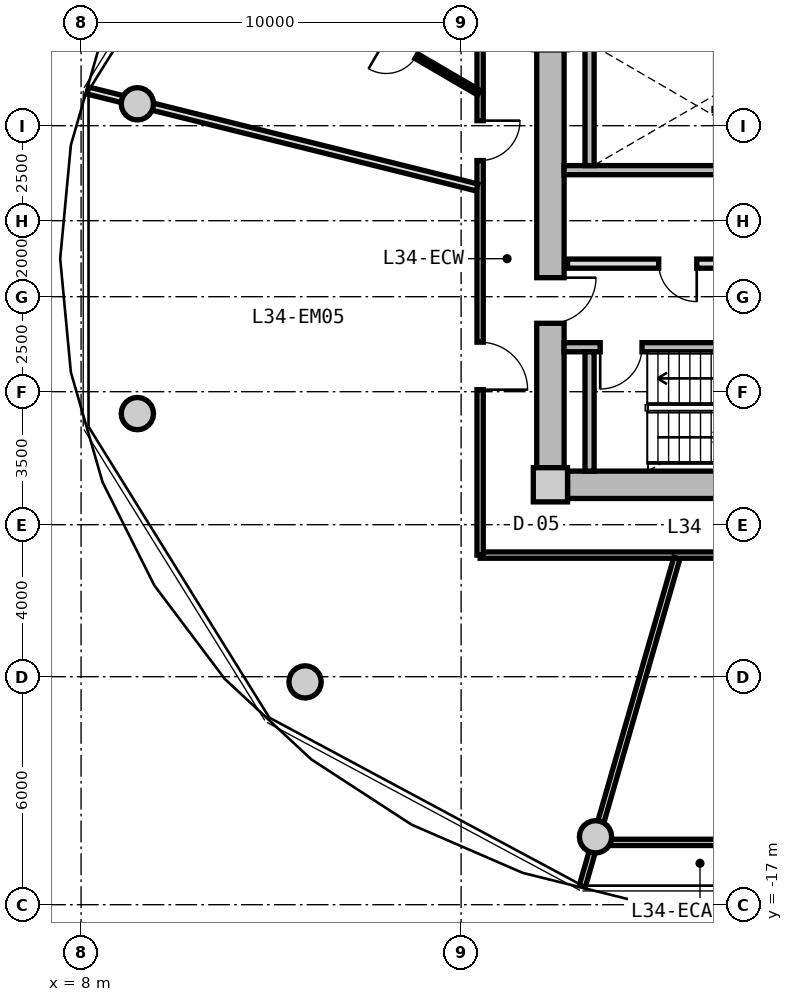
"""IFC4 building model, lengths in metres.
Left out: names, types, materials, properties, quantities, classifications, styles, units other than length and angle.
Written with IfcOpenShell. Run it as: python <this file> out.ifc"""

import sys

from ifc_helpers import new_model, si_unit, direction, frame, frame_2d, origin, origin_2d, place, context, subcontext, project, spatial, rectangle, circle, extrude, source, transform, mapped, element, fill, save


model = new_model("IFC4")
c1 = context("Model", 3, precision=1e-05, world=origin(), true_north=direction((0.0, 1.0)))
c2 = subcontext(c1, "Body", "Model", "MODEL_VIEW")
j1 = project(units=[si_unit("LENGTHUNIT", "METRE"), si_unit("PLANEANGLEUNIT", "RADIAN")], contexts=[c1])
p1 = place(None, origin())
s1 = spatial("IfcSite", under=j1, at=p1, CompositionType="ELEMENT")
p2 = place(p1, origin())
s2 = spatial("IfcBuilding", under=s1, at=p2, CompositionType="ELEMENT")
p3 = place(p2, frame((0.0, 0.0, 111.5)))
s3 = spatial("IfcBuildingStorey", under=s2, at=p3, CompositionType="ELEMENT", Elevation=111.5)
m1 = source(origin(), c2, "Body", "SweptSolid", [
    extrude(rectangle(XDim=0.9, YDim=0.9, at=origin_2d()), origin(), (0.0, 0.0, 1.0), 3.05),
])
p4 = place(p3, frame((20.35, -5.95, 0.0), z_axis=(0.0, 0.0, 1.0), x_axis=(1.0, 0.0, 0.0)))
e1 = element("IfcColumn", 1, at=p4, inside=s3, PredefinedType="COLUMN", context=c2, shape_type="MappedRepresentation", body=[
    mapped(m1, transform((0.0, 0.0, 0.0), x_axis=(1.0, 0.0, 0.0), y_axis=(0.0, 1.0, 0.0), z_axis=(0.0, 0.0, 1.0), scale=1.0)),
])
m2 = source(origin(), c2, "Body", "SweptSolid", [
    extrude(rectangle(XDim=14.4, YDim=0.72, at=frame_2d((7.2, 0.0))), origin(), (0.0, 0.0, 1.0), 2.79),
])
p5 = place(p3, frame((35.2, -5.95, 0.0), z_axis=(0.0, 0.0, 1.0), x_axis=(-1.0, 0.0, 0.0)))
e2 = element("IfcWall", 2, at=p5, inside=s3, PredefinedType="SHEAR", context=c2, shape_type="MappedRepresentation", body=[
    mapped(m2, transform((0.0, 0.0, 0.0), x_axis=(1.0, 0.0, 0.0), y_axis=(0.0, 1.0, 0.0), z_axis=(0.0, 0.0, 1.0), scale=1.0)),
])
m3 = source(origin(), c2, "Body", "SweptSolid", [
    extrude(rectangle(XDim=11.0, YDim=0.72, at=frame_2d((5.5, 0.0))), origin(), (0.0, 0.0, 1.0), 2.79),
])
p6 = place(p3, frame((20.35, -5.5, 0.0), z_axis=(0.0, 0.0, 1.0), x_axis=(0.0, 1.0, 0.0)))
e3 = element("IfcWall", 3, at=p6, inside=s3, PredefinedType="SHEAR", context=c2, shape_type="MappedRepresentation", body=[
    mapped(m3, transform((0.0, 0.0, 0.0), x_axis=(1.0, 0.0, 0.0), y_axis=(0.0, 1.0, 0.0), z_axis=(0.0, 0.0, 1.0), scale=1.0)),
])
p7 = place(p6, frame((3.8, 0.0, 0.0)))
e4 = element("IfcOpeningElement", 4, at=p7, cuts=e3, PredefinedType="OPENING", context=c2, shape_type="SweptSolid", body=[
    extrude(rectangle(XDim=1.2, YDim=2.15, at=frame_2d((0.6, 1.075))), frame((0.0, 0.37, 0.0), z_axis=(0.0, -1.0, 0.0), x_axis=(1.0, 0.0, 0.0)), (0.0, 0.0, 1.0), 0.74),
])
m4 = source(origin(), c2, "Body", "SweptSolid", [
    extrude(circle(Radius=0.425, at=origin_2d()), origin(), (0.0, 0.0, 1.0), 3.05),
])
for number, where, z_axis, x_axis in (
    (5, (9.481, 4.076, 0.0), (0.0, 0.0, 1.0), (1.0, 0.0, 0.0)),
    (6, (9.481, -4.076, 0.0), (0.0, 0.0, 1.0), (1.0, 0.0, 0.0)),
    (7, (13.894, -11.137, 0.0), (0.0, 0.0, 1.0), (1.0, 0.0, 0.0)),
    (8, (21.537, -15.213, 0.0), (0.0, 0.0, 1.0), (1.0, 0.0, 0.0)),
):
    element("IfcColumn", number, at=place(p3, frame(where, z_axis=z_axis, x_axis=x_axis)), inside=s3, PredefinedType="COLUMN", context=c2, shape_type="MappedRepresentation", body=[
        mapped(m4, transform((0.0, 0.0, 0.0), x_axis=(1.0, 0.0, 0.0), y_axis=(0.0, 1.0, 0.0), z_axis=(0.0, 0.0, 1.0), scale=1.0)),
    ])
m5 = source(origin(), c2, "Body", "SweptSolid", [
    extrude(rectangle(XDim=7.83, YDim=0.24, at=frame_2d((3.915, 0.0))), origin(), (0.0, 0.0, 1.0), 2.79),
])
p8 = place(p3, frame((20.71, 2.33, 0.0), z_axis=(0.0, 0.0, 1.0), x_axis=(1.0, 0.0, 0.0)))
e9 = element("IfcWall", 9, at=p8, inside=s3, PredefinedType="PARTITIONING", context=c2, shape_type="MappedRepresentation", body=[
    mapped(m5, transform((0.0, 0.0, 0.0), x_axis=(1.0, 0.0, 0.0), y_axis=(0.0, 1.0, 0.0), z_axis=(0.0, 0.0, 1.0), scale=1.0)),
])
m6 = source(origin(), c2, "Body", "SweptSolid", [
    extrude(rectangle(XDim=3.14, YDim=0.24, at=frame_2d((1.57, 0.0))), origin(), (0.0, 0.0, 1.0), 2.79),
])
p9 = place(p3, frame((21.38, 2.45, 0.0), z_axis=(0.0, 0.0, 1.0), x_axis=(0.0, 1.0, 0.0)))
e10 = element("IfcWall", 10, at=p9, inside=s3, PredefinedType="PARTITIONING", context=c2, shape_type="MappedRepresentation", body=[
    mapped(m6, transform((0.0, 0.0, 0.0), x_axis=(1.0, 0.0, 0.0), y_axis=(0.0, 1.0, 0.0), z_axis=(0.0, 0.0, 1.0), scale=1.0)),
])
p10 = place(p3, frame((20.71, -2.33, 0.0), z_axis=(0.0, 0.0, 1.0), x_axis=(1.0, 0.0, 0.0)))
e11 = element("IfcWall", 11, at=p10, inside=s3, PredefinedType="PARTITIONING", context=c2, shape_type="MappedRepresentation", body=[
    mapped(m5, transform((0.0, 0.0, 0.0), x_axis=(1.0, 0.0, 0.0), y_axis=(0.0, 1.0, 0.0), z_axis=(0.0, 0.0, 1.0), scale=1.0)),
])
p11 = place(p10, frame((0.95, 0.0, 0.0)))
e12 = element("IfcOpeningElement", 12, at=p11, cuts=e11, PredefinedType="OPENING", context=c2, shape_type="SweptSolid", body=[
    extrude(rectangle(XDim=1.1, YDim=2.15, at=frame_2d((0.55, 1.075))), frame((0.0, 0.13, 0.0), z_axis=(0.0, -1.0, 0.0), x_axis=(1.0, 0.0, 0.0)), (0.0, 0.0, 1.0), 0.26),
])
p12 = place(p3, frame((21.38, -5.59, 0.0), z_axis=(0.0, 0.0, 1.0), x_axis=(0.0, 1.0, 0.0)))
e13 = element("IfcWall", 13, at=p12, inside=s3, PredefinedType="PARTITIONING", context=c2, shape_type="MappedRepresentation", body=[
    mapped(m6, transform((0.0, 0.0, 0.0), x_axis=(1.0, 0.0, 0.0), y_axis=(0.0, 1.0, 0.0), z_axis=(0.0, 0.0, 1.0), scale=1.0)),
])
m7 = source(origin(), c2, "Body", "SweptSolid", [
    extrude(rectangle(XDim=7.62, YDim=0.24, at=frame_2d((3.81, 0.0))), origin(), (0.0, 0.0, 1.0), 2.775),
])
p13 = place(p3, frame((20.8, -0.13, 0.0), z_axis=(0.0, 0.0, 1.0), x_axis=(1.0, 0.0, 0.0)))
e14 = element("IfcWall", 14, at=p13, inside=s3, PredefinedType="PARTITIONING", context=c2, shape_type="MappedRepresentation", body=[
    mapped(m7, transform((0.0, 0.0, 0.0), x_axis=(1.0, 0.0, 0.0), y_axis=(0.0, 1.0, 0.0), z_axis=(0.0, 0.0, 1.0), scale=1.0)),
])
p14 = place(p13, frame((6.22, 0.0, 0.0)))
e15 = element("IfcOpeningElement", 15, at=p14, cuts=e14, PredefinedType="OPENING", context=c2, shape_type="SweptSolid", body=[
    extrude(rectangle(XDim=1.0, YDim=2.1, at=frame_2d((0.5, 1.05))), frame((0.0, 0.13, 0.0), z_axis=(0.0, -1.0, 0.0), x_axis=(1.0, 0.0, 0.0)), (0.0, 0.0, 1.0), 0.26),
])
p15 = place(p13, frame((2.4, 0.0, 0.0)))
e16 = element("IfcOpeningElement", 16, at=p15, cuts=e14, PredefinedType="OPENING", context=c2, shape_type="SweptSolid", body=[
    extrude(rectangle(XDim=1.0, YDim=2.1, at=frame_2d((0.5, 1.05))), frame((0.0, 0.13, 0.0), z_axis=(0.0, -1.0, 0.0), x_axis=(1.0, 0.0, 0.0)), (0.0, 0.0, 1.0), 0.26),
])
m8 = source(origin(), c2, "Body", "SweptSolid", [
    extrude(rectangle(XDim=8.6, YDim=0.165, at=frame_2d((4.3, 0.0))), origin(), (0.0, 0.0, 1.0), 2.775),
])
p16 = place(p3, frame((27.1, -7.8, 0.0), z_axis=(0.0, 0.0, 1.0), x_axis=(-1.0, 0.0, 0.0)))
e17 = element("IfcWall", 17, at=p16, inside=s3, PredefinedType="PARTITIONING", context=c2, shape_type="MappedRepresentation", body=[
    mapped(m8, transform((0.0, 0.0, 0.0), x_axis=(1.0, 0.0, 0.0), y_axis=(0.0, 1.0, 0.0), z_axis=(0.0, 0.0, 1.0), scale=1.0)),
])
m9 = source(origin(), c2, "Body", "SweptSolid", [
    extrude(rectangle(XDim=15.6, YDim=0.165, at=frame_2d((7.8, 0.0))), origin(), (0.0, 0.0, 1.0), 2.775),
])
p17 = place(p3, frame((18.5, -7.8, 0.0), z_axis=(0.0, 0.0, 1.0), x_axis=(0.0, 1.0, 0.0)))
e18 = element("IfcWall", 18, at=p17, inside=s3, PredefinedType="PARTITIONING", context=c2, shape_type="MappedRepresentation", body=[
    mapped(m9, transform((0.0, 0.0, 0.0), x_axis=(1.0, 0.0, 0.0), y_axis=(0.0, 1.0, 0.0), z_axis=(0.0, 0.0, 1.0), scale=1.0)),
])
p18 = place(p17, frame((10.383, 0.0, 0.0)))
e19 = element("IfcOpeningElement", 19, at=p18, cuts=e18, PredefinedType="OPENING", context=c2, shape_type="SweptSolid", body=[
    extrude(rectangle(XDim=1.05, YDim=2.15, at=frame_2d((0.525, 1.075))), frame((0.0, 0.093, 0.0), z_axis=(0.0, -1.0, 0.0), x_axis=(1.0, 0.0, 0.0)), (0.0, 0.0, 1.0), 0.185),
])
p19 = place(p17, frame((4.353, 0.0, 0.0)))
e20 = element("IfcOpeningElement", 20, at=p19, cuts=e18, PredefinedType="OPENING", context=c2, shape_type="SweptSolid", body=[
    extrude(rectangle(XDim=1.25, YDim=2.2, at=frame_2d((0.625, 1.1))), frame((0.0, 0.093, 0.0), z_axis=(0.0, -1.0, 0.0), x_axis=(1.0, 0.0, 0.0)), (0.0, 0.0, 1.0), 0.185),
])
m10 = source(origin(), c2, "Body", "SweptSolid", [
    extrude(rectangle(XDim=8.989, YDim=0.165, at=frame_2d((4.495, 0.0))), origin(), (0.0, 0.0, 1.0), 2.275),
])
p20 = place(p3, frame((23.678, -7.88, 0.0), z_axis=(0.0, 0.0, 1.0), x_axis=(-0.27702323008, -0.960863221274, 0.0)))
e21 = element("IfcWall", 21, at=p20, inside=s3, PredefinedType="PARTITIONING", context=c2, shape_type="MappedRepresentation", body=[
    mapped(m10, transform((0.0, 0.0, 0.0), x_axis=(1.0, 0.0, 0.0), y_axis=(0.0, 1.0, 0.0), z_axis=(0.0, 0.0, 1.0), scale=1.0)),
])
m11 = source(origin(), c2, "Body", "SweptSolid", [
    extrude(rectangle(XDim=5.814, YDim=0.165, at=frame_2d((2.907, 0.0))), origin(), (0.0, 0.0, 1.0), 2.275),
])
p21 = place(p3, frame((21.366, -15.36, 0.0), z_axis=(0.0, 0.0, 1.0), x_axis=(1.0, 0.0, 0.0)))
e22 = element("IfcWall", 22, at=p21, inside=s3, PredefinedType="PARTITIONING", context=c2, shape_type="MappedRepresentation", body=[
    mapped(m11, transform((0.0, 0.0, 0.0), x_axis=(1.0, 0.0, 0.0), y_axis=(0.0, 1.0, 0.0), z_axis=(0.0, 0.0, 1.0), scale=1.0)),
])
m12 = source(origin(), c2, "Body", "SweptSolid", [
    extrude(rectangle(XDim=10.556, YDim=0.19, at=frame_2d((5.278, 0.0))), origin(), (0.0, 0.0, 1.0), 2.275),
])
p22 = place(p3, frame((18.42, 1.875, 0.0), z_axis=(0.0, 0.0, 1.0), x_axis=(-0.970363857851, 0.241648470667, 0.0)))
e23 = element("IfcWall", 23, at=p22, inside=s3, PredefinedType="PARTITIONING", context=c2, shape_type="MappedRepresentation", body=[
    mapped(m12, transform((0.0, 0.0, 0.0), x_axis=(1.0, 0.0, 0.0), y_axis=(0.0, 1.0, 0.0), z_axis=(0.0, 0.0, 1.0), scale=1.0)),
])
m13 = source(origin(), c2, "Body", "SweptSolid", [
    extrude(rectangle(XDim=4.735, YDim=0.14, at=frame_2d((2.368, 0.0))), origin(), (0.0, 0.0, 1.0), 2.775),
])
p23 = place(p3, frame((18.47, 4.368, 0.0), z_axis=(0.0, 0.0, 1.0), x_axis=(-0.863537576642, 0.504284496814, 0.0)))
e24 = element("IfcWall", 24, at=p23, inside=s3, PredefinedType="PARTITIONING", context=c2, shape_type="MappedRepresentation", body=[
    mapped(m13, transform((0.0, 0.0, 0.0), x_axis=(1.0, 0.0, 0.0), y_axis=(0.0, 1.0, 0.0), z_axis=(0.0, 0.0, 1.0), scale=1.0)),
])
p24 = place(p23, frame((1.908, 0.0, 0.0)))
e25 = element("IfcOpeningElement", 25, at=p24, cuts=e24, PredefinedType="OPENING", context=c2, shape_type="SweptSolid", body=[
    extrude(rectangle(XDim=0.92, YDim=2.1, at=frame_2d((0.46, 1.05))), frame((0.0, 0.08, 0.0), z_axis=(0.0, -1.0, 0.0), x_axis=(1.0, 0.0, 0.0)), (0.0, 0.0, 1.0), 0.16),
])
m14 = source(origin(), c2, "Body", "SweptSolid", [
    extrude(rectangle(XDim=1.1, YDim=2.15, at=frame_2d((0.55, 1.075))), frame((0.0, 0.025, 0.0), z_axis=(0.0, -1.0, 0.0), x_axis=(1.0, 0.0, 0.0)), (0.0, 0.0, 1.0), 0.05),
])
p25 = place(p11, frame((1.1, 0.0, 0.0), z_axis=(0.0, 0.0, 1.0), x_axis=(-1.0, 0.0, 0.0)))
e26 = element("IfcDoor", 26, at=p25, inside=s3, OperationType="SINGLE_SWING_RIGHT", PredefinedType="DOOR", context=c2, shape_type="MappedRepresentation", body=[
    mapped(m14, transform((0.0, 0.0, 0.0), x_axis=(1.0, 0.0, 0.0), y_axis=(0.0, 1.0, 0.0), z_axis=(0.0, 0.0, 1.0), scale=1.0)),
])
fill(e12, e26)
m15 = source(origin(), c2, "Body", "SweptSolid", [
    extrude(rectangle(XDim=1.2, YDim=2.15, at=frame_2d((0.6, 1.075))), frame((0.0, 0.025, 0.0), z_axis=(0.0, -1.0, 0.0), x_axis=(1.0, 0.0, 0.0)), (0.0, 0.0, 1.0), 0.05),
])
p26 = place(p7, frame((1.2, 0.0, 0.0), z_axis=(0.0, 0.0, 1.0), x_axis=(-1.0, 0.0, 0.0)))
e27 = element("IfcDoor", 27, at=p26, inside=s3, OperationType="SINGLE_SWING_LEFT", PredefinedType="DOOR", context=c2, shape_type="MappedRepresentation", body=[
    mapped(m15, transform((0.0, 0.0, 0.0), x_axis=(1.0, 0.0, 0.0), y_axis=(0.0, 1.0, 0.0), z_axis=(0.0, 0.0, 1.0), scale=1.0)),
])
fill(e4, e27)
m16 = source(origin(), c2, "Body", "SweptSolid", [
    extrude(rectangle(XDim=1.0, YDim=2.1, at=frame_2d((0.5, 1.05))), frame((0.0, 0.025, 0.0), z_axis=(0.0, -1.0, 0.0), x_axis=(1.0, 0.0, 0.0)), (0.0, 0.0, 1.0), 0.05),
])
p27 = place(p15, frame((1.0, 0.0, 0.0), z_axis=(0.0, 0.0, 1.0), x_axis=(-1.0, 0.0, 0.0)))
e28 = element("IfcDoor", 28, at=p27, inside=s3, OperationType="SINGLE_SWING_LEFT", PredefinedType="DOOR", context=c2, shape_type="MappedRepresentation", body=[
    mapped(m16, transform((0.0, 0.0, 0.0), x_axis=(1.0, 0.0, 0.0), y_axis=(0.0, 1.0, 0.0), z_axis=(0.0, 0.0, 1.0), scale=1.0)),
])
fill(e16, e28)
m17 = source(origin(), c2, "Body", "SweptSolid", [
    extrude(rectangle(XDim=1.05, YDim=2.15, at=frame_2d((0.525, 1.075))), frame((0.0, 0.025, 0.0), z_axis=(0.0, -1.0, 0.0), x_axis=(1.0, 0.0, 0.0)), (0.0, 0.0, 1.0), 0.05),
])
p28 = place(p18, frame((1.05, 0.0, 0.0), z_axis=(0.0, 0.0, 1.0), x_axis=(-1.0, 0.0, 0.0)))
e29 = element("IfcDoor", 29, at=p28, inside=s3, OperationType="SINGLE_SWING_LEFT", PredefinedType="DOOR", context=c2, shape_type="MappedRepresentation", body=[
    mapped(m17, transform((0.0, 0.0, 0.0), x_axis=(1.0, 0.0, 0.0), y_axis=(0.0, 1.0, 0.0), z_axis=(0.0, 0.0, 1.0), scale=1.0)),
])
fill(e19, e29)
m18 = source(origin(), c2, "Body", "SweptSolid", [
    extrude(rectangle(XDim=0.92, YDim=2.1, at=frame_2d((0.46, 1.05))), frame((0.0, 0.025, 0.0), z_axis=(0.0, -1.0, 0.0), x_axis=(1.0, 0.0, 0.0)), (0.0, 0.0, 1.0), 0.05),
])
p29 = place(p24, origin())
e30 = element("IfcDoor", 30, at=p29, inside=s3, OperationType="SINGLE_SWING_RIGHT", PredefinedType="DOOR", context=c2, shape_type="MappedRepresentation", body=[
    mapped(m18, transform((0.0, 0.0, 0.0), x_axis=(1.0, 0.0, 0.0), y_axis=(0.0, 1.0, 0.0), z_axis=(0.0, 0.0, 1.0), scale=1.0)),
])
fill(e25, e30)
m19 = source(origin(), c2, "Body", "SweptSolid", [
    extrude(rectangle(XDim=1.25, YDim=2.2, at=frame_2d((0.625, 1.1))), frame((0.0, 0.025, 0.0), z_axis=(0.0, -1.0, 0.0), x_axis=(1.0, 0.0, 0.0)), (0.0, 0.0, 1.0), 0.05),
])
p30 = place(p19, frame((1.25, 0.0, 0.0), z_axis=(0.0, 0.0, 1.0), x_axis=(-1.0, 0.0, 0.0)))
e31 = element("IfcDoor", 31, at=p30, inside=s3, OperationType="SINGLE_SWING_RIGHT", PredefinedType="DOOR", context=c2, shape_type="MappedRepresentation", body=[
    mapped(m19, transform((0.0, 0.0, 0.0), x_axis=(1.0, 0.0, 0.0), y_axis=(0.0, 1.0, 0.0), z_axis=(0.0, 0.0, 1.0), scale=1.0)),
])
fill(e20, e31)
save(model, sys.argv[1])
